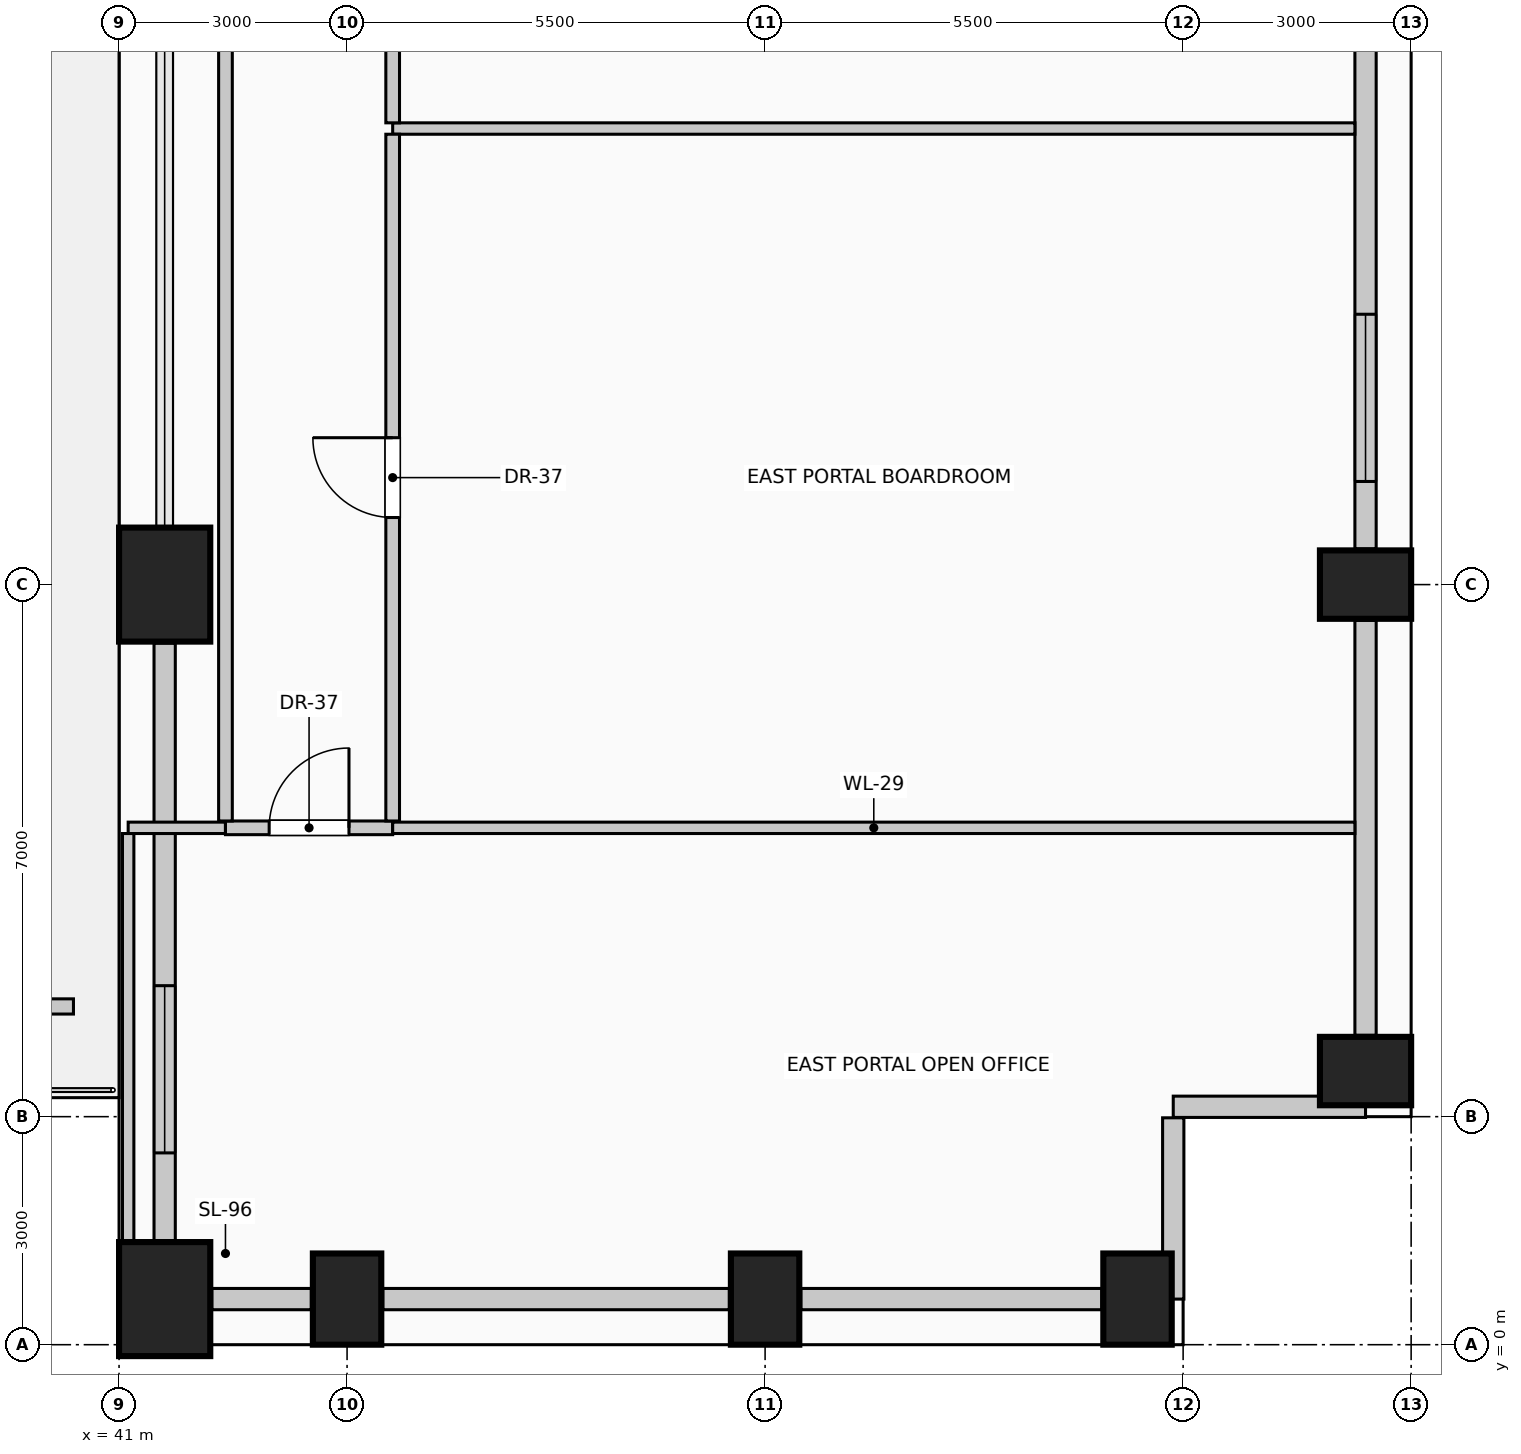
"""IFC4 building model, lengths in metres.
Left out: names, types, materials, properties, quantities, classifications, styles, units other than length and angle.
Written with IfcOpenShell. Run it as: python <this file> out.ifc"""

import sys

from ifc_helpers import new_model, si_unit, direction, frame, frame_2d, origin, origin_2d, place, context, subcontext, project, spatial, rectangle, extrude, element, fill, save


model = new_model("IFC4")
c1 = context("Model", 3, precision=1e-05, world=origin(), true_north=direction((0.0, 1.0)))
c2 = subcontext(c1, "Body", "Model", "MODEL_VIEW")
j1 = project(units=[si_unit("LENGTHUNIT", "METRE"), si_unit("PLANEANGLEUNIT", "RADIAN")], contexts=[c1])
p1 = place(None, origin())
s1 = spatial("IfcSite", under=j1, at=p1, CompositionType="ELEMENT")
p2 = place(p1, origin())
s2 = spatial("IfcBuilding", under=s1, at=p2, CompositionType="ELEMENT")
p3 = place(p2, frame((0.0, 0.0, 22.6)))
s3 = spatial("IfcBuildingStorey", under=s2, at=p3, CompositionType="ELEMENT", Elevation=22.6)
p4 = place(p3, frame((41.6, 0.6, 0.0), z_axis=(0.0, 0.0, 1.0), x_axis=(1.0, 0.0, 0.0)))
e1 = element("IfcColumn", 1, at=p4, inside=s3, PredefinedType="COLUMN", context=c2, shape_type="SweptSolid", body=[
    extrude(rectangle(XDim=1.2, YDim=1.5, at=origin_2d()), origin(), (0.0, 0.0, 1.0), 4.0),
])
for number, where, z_axis, x_axis in (
    (2, (44.0, 0.6, 0.0), (0.0, 0.0, 1.0), (1.0, 0.0, 0.0)),
    (3, (49.5, 0.6, 0.0), (0.0, 0.0, 1.0), (1.0, 0.0, 0.0)),
    (4, (54.4, 0.6, 0.0), (0.0, 0.0, 1.0), (1.0, 0.0, 0.0)),
    (5, (57.4, 3.6, 0.0), (0.0, 0.0, 1.0), (0.0, 1.0, 0.0)),
    (6, (57.4, 10.0, 0.0), (0.0, 0.0, 1.0), (0.0, 1.0, 0.0)),
):
    element("IfcColumn", number, at=place(p3, frame(where, z_axis=z_axis, x_axis=x_axis)), inside=s3, PredefinedType="COLUMN", context=c2, shape_type="SweptSolid", body=[
        extrude(rectangle(XDim=0.9, YDim=1.2, at=origin_2d()), origin(), (0.0, 0.0, 1.0), 4.0),
    ])
p5 = place(p3, frame((41.6, 10.0, 0.0), z_axis=(0.0, 0.0, 1.0), x_axis=(1.0, 0.0, 0.0)))
e7 = element("IfcColumn", 7, at=p5, inside=s3, PredefinedType="COLUMN", context=c2, shape_type="SweptSolid", body=[
    extrude(rectangle(XDim=1.2, YDim=1.5, at=origin_2d()), origin(), (0.0, 0.0, 1.0), 4.0),
])
p6 = place(p3, frame((43.53, 0.6, 0.0), z_axis=(0.0, 0.0, 1.0), x_axis=(-1.0, 0.0, 0.0)))
e8 = element("IfcWall", 8, at=p6, inside=s3, PredefinedType="SOLIDWALL", context=c2, shape_type="SweptSolid", body=[
    extrude(rectangle(XDim=1.31, YDim=0.28, at=frame_2d((0.655, 0.0))), origin(), (0.0, 0.0, 1.0), 2.85),
])
p7 = place(p3, frame((49.03, 0.6, 0.0), z_axis=(0.0, 0.0, 1.0), x_axis=(-1.0, 0.0, 0.0)))
e9 = element("IfcWall", 9, at=p7, inside=s3, PredefinedType="SOLIDWALL", context=c2, shape_type="SweptSolid", body=[
    extrude(rectangle(XDim=4.56, YDim=0.28, at=frame_2d((2.28, 0.0))), origin(), (0.0, 0.0, 1.0), 2.85),
])
p8 = place(p3, frame((53.93, 0.6, 0.0), z_axis=(0.0, 0.0, 1.0), x_axis=(-1.0, 0.0, 0.0)))
e10 = element("IfcWall", 10, at=p8, inside=s3, PredefinedType="SOLIDWALL", context=c2, shape_type="SweptSolid", body=[
    extrude(rectangle(XDim=3.96, YDim=0.28, at=frame_2d((1.98, 0.0))), origin(), (0.0, 0.0, 1.0), 2.85),
])
p9 = place(p3, frame((57.4, 9.53, 0.0), z_axis=(0.0, 0.0, 1.0), x_axis=(0.0, -1.0, 0.0)))
e11 = element("IfcWall", 11, at=p9, inside=s3, PredefinedType="SOLIDWALL", context=c2, shape_type="SweptSolid", body=[
    extrude(rectangle(XDim=5.46, YDim=0.28, at=frame_2d((2.73, 0.0))), origin(), (0.0, 0.0, 1.0), 2.85),
])
p10 = place(p3, frame((57.4, 17.53, 0.0), z_axis=(0.0, 0.0, 1.0), x_axis=(0.0, -1.0, 0.0)))
e12 = element("IfcWall", 12, at=p10, inside=s3, PredefinedType="SOLIDWALL", context=c2, shape_type="SweptSolid", body=[
    extrude(rectangle(XDim=7.06, YDim=0.28, at=frame_2d((3.53, 0.0))), origin(), (0.0, 0.0, 1.0), 2.85),
])
p11 = place(p10, frame((3.973, 0.0, 0.42)))
e13 = element("IfcOpeningElement", 13, at=p11, cuts=e12, PredefinedType="OPENING", context=c2, shape_type="SweptSolid", body=[
    extrude(rectangle(XDim=2.2, YDim=1.95, at=frame_2d((1.1, 0.975))), frame((0.0, 0.15, 0.0), z_axis=(0.0, -1.0, 0.0), x_axis=(1.0, 0.0, 0.0)), (0.0, 0.0, 1.0), 0.3),
])
p12 = place(p3, frame((57.4, 3.13, 0.0), z_axis=(0.0, 0.0, 1.0), x_axis=(-1.0, 0.0, 0.0)))
e14 = element("IfcWall", 14, at=p12, inside=s3, PredefinedType="SOLIDWALL", context=c2, shape_type="SweptSolid", body=[
    extrude(rectangle(XDim=2.53, YDim=0.28, at=frame_2d((1.265, 0.0))), origin(), (0.0, 0.0, 1.0), 3.7),
])
p13 = place(p3, frame((54.87, 2.985, 0.0), z_axis=(0.0, 0.0, 1.0), x_axis=(0.0, -1.0, 0.0)))
e15 = element("IfcWall", 15, at=p13, inside=s3, PredefinedType="SOLIDWALL", context=c2, shape_type="SweptSolid", body=[
    extrude(rectangle(XDim=2.385, YDim=0.28, at=frame_2d((1.192, 0.0))), origin(), (0.0, 0.0, 1.0), 3.7),
])
p14 = place(p3, frame((41.6, 1.37, 0.0), z_axis=(0.0, 0.0, 1.0), x_axis=(0.0, 1.0, 0.0)))
e16 = element("IfcWall", 16, at=p14, inside=s3, PredefinedType="SOLIDWALL", context=c2, shape_type="SweptSolid", body=[
    extrude(rectangle(XDim=7.86, YDim=0.28, at=frame_2d((3.93, 0.0))), origin(), (0.0, 0.0, 1.0), 3.0),
])
p15 = place(p14, frame((1.153, 0.0, 0.42)))
e17 = element("IfcOpeningElement", 17, at=p15, cuts=e16, PredefinedType="OPENING", context=c2, shape_type="SweptSolid", body=[
    extrude(rectangle(XDim=2.2, YDim=1.95, at=frame_2d((1.1, 0.975))), frame((0.0, 0.15, 0.0), z_axis=(0.0, -1.0, 0.0), x_axis=(1.0, 0.0, 0.0)), (0.0, 0.0, 1.0), 0.3),
])
p16 = place(p3, frame((17.6, 4.45, 0.0), z_axis=(0.0, 0.0, 1.0), x_axis=(1.0, 0.0, 0.0)))
e18 = element("IfcWall", 18, at=p16, inside=s3, PredefinedType="USERDEFINED", context=c2, shape_type="SweptSolid", body=[
    extrude(rectangle(XDim=22.8, YDim=0.2, at=frame_2d((11.4, 0.0))), origin(), (0.0, 0.0, 1.0), 0.55),
])
p17 = place(p3, frame((41.12, 6.8, 0.0), z_axis=(0.0, 0.0, 1.0), x_axis=(1.0, 0.0, 0.0)))
e19 = element("IfcWall", 19, at=p17, inside=s3, PredefinedType="PARTITIONING", context=c2, shape_type="SweptSolid", body=[
    extrude(rectangle(XDim=1.28, YDim=0.15, at=frame_2d((0.64, 0.0))), origin(), (0.0, 0.0, 1.0), 3.095),
])
p18 = place(p3, frame((42.4, 6.8, 0.0), z_axis=(0.0, 0.0, 1.0), x_axis=(1.0, 0.0, 0.0)))
e20 = element("IfcWall", 20, at=p18, inside=s3, PredefinedType="PARTITIONING", context=c2, shape_type="SweptSolid", body=[
    extrude(rectangle(XDim=2.2, YDim=0.18, at=frame_2d((1.1, 0.0))), origin(), (0.0, 0.0, 1.0), 3.095),
])
p19 = place(p18, frame((0.575, 0.0, 0.0)))
e21 = element("IfcOpeningElement", 21, at=p19, cuts=e20, PredefinedType="OPENING", context=c2, shape_type="SweptSolid", body=[
    extrude(rectangle(XDim=1.05, YDim=2.15, at=frame_2d((0.525, 1.075))), frame((0.0, 0.1, 0.0), z_axis=(0.0, -1.0, 0.0), x_axis=(1.0, 0.0, 0.0)), (0.0, 0.0, 1.0), 0.2),
])
p20 = place(p3, frame((44.6, 6.8, 0.0), z_axis=(0.0, 0.0, 1.0), x_axis=(1.0, 0.0, 0.0)))
e22 = element("IfcWall", 22, at=p20, inside=s3, PredefinedType="PARTITIONING", context=c2, shape_type="SweptSolid", body=[
    extrude(rectangle(XDim=12.66, YDim=0.15, at=frame_2d((6.33, 0.0))), origin(), (0.0, 0.0, 1.0), 3.095),
])
p21 = place(p3, frame((44.6, 16.0, 0.0), z_axis=(0.0, 0.0, 1.0), x_axis=(1.0, 0.0, 0.0)))
e23 = element("IfcWall", 23, at=p21, inside=s3, PredefinedType="PARTITIONING", context=c2, shape_type="SweptSolid", body=[
    extrude(rectangle(XDim=12.66, YDim=0.15, at=frame_2d((6.33, 0.0))), origin(), (0.0, 0.0, 1.0), 3.7),
])
p22 = place(p3, frame((41.12, 1.35, 0.0), z_axis=(0.0, 0.0, 1.0), x_axis=(0.0, 1.0, 0.0)))
e24 = element("IfcWall", 24, at=p22, inside=s3, PredefinedType="PARTITIONING", context=c2, shape_type="SweptSolid", body=[
    extrude(rectangle(XDim=5.375, YDim=0.15, at=frame_2d((2.688, 0.0))), origin(), (0.0, 0.0, 1.0), 3.7),
])
p23 = place(p3, frame((42.4, 6.89, 0.0), z_axis=(0.0, 0.0, 1.0), x_axis=(0.0, 1.0, 0.0)))
e25 = element("IfcWall", 25, at=p23, inside=s3, PredefinedType="PARTITIONING", context=c2, shape_type="SweptSolid", body=[
    extrude(rectangle(XDim=25.385, YDim=0.18, at=frame_2d((12.692, 0.0))), origin(), (0.0, 0.0, 1.0), 3.7),
])
p24 = place(p3, frame((44.6, 6.89, 0.0), z_axis=(0.0, 0.0, 1.0), x_axis=(0.0, 1.0, 0.0)))
e26 = element("IfcWall", 26, at=p24, inside=s3, PredefinedType="PARTITIONING", context=c2, shape_type="SweptSolid", body=[
    extrude(rectangle(XDim=9.035, YDim=0.18, at=frame_2d((4.518, 0.0))), origin(), (0.0, 0.0, 1.0), 3.7),
])
p25 = place(p24, frame((3.992, 0.0, 0.0)))
e27 = element("IfcOpeningElement", 27, at=p25, cuts=e26, PredefinedType="OPENING", context=c2, shape_type="SweptSolid", body=[
    extrude(rectangle(XDim=1.05, YDim=2.15, at=frame_2d((0.525, 1.075))), frame((0.0, 0.1, 0.0), z_axis=(0.0, -1.0, 0.0), x_axis=(1.0, 0.0, 0.0)), (0.0, 0.0, 1.0), 0.2),
])
p26 = place(p3, frame((44.6, 16.075, 0.0), z_axis=(0.0, 0.0, 1.0), x_axis=(0.0, 1.0, 0.0)))
e28 = element("IfcWall", 28, at=p26, inside=s3, PredefinedType="PARTITIONING", context=c2, shape_type="SweptSolid", body=[
    extrude(rectangle(XDim=5.25, YDim=0.18, at=frame_2d((2.625, 0.0))), origin(), (0.0, 0.0, 1.0), 3.7),
])
p27 = place(p26, frame((2.15, 0.0, 0.0)))
e29 = element("IfcOpeningElement", 29, at=p27, cuts=e28, PredefinedType="OPENING", context=c2, shape_type="SweptSolid", body=[
    extrude(rectangle(XDim=0.95, YDim=2.15, at=frame_2d((0.475, 1.075))), frame((0.0, 0.1, 0.0), z_axis=(0.0, -1.0, 0.0), x_axis=(1.0, 0.0, 0.0)), (0.0, 0.0, 1.0), 0.2),
])
p28 = place(p11, origin())
e30 = element("IfcWindow", 30, at=p28, inside=s3, PartitioningType="SINGLE_PANEL", PredefinedType="WINDOW", context=c2, shape_type="SweptSolid", body=[
    extrude(rectangle(XDim=2.2, YDim=1.95, at=frame_2d((1.1, 0.975))), frame((0.0, 0.03, 0.0), z_axis=(0.0, -1.0, 0.0), x_axis=(1.0, 0.0, 0.0)), (0.0, 0.0, 1.0), 0.06),
])
fill(e13, e30)
p29 = place(p15, origin())
e31 = element("IfcWindow", 31, at=p29, inside=s3, PartitioningType="SINGLE_PANEL", PredefinedType="WINDOW", context=c2, shape_type="SweptSolid", body=[
    extrude(rectangle(XDim=2.2, YDim=1.95, at=frame_2d((1.1, 0.975))), frame((0.0, 0.03, 0.0), z_axis=(0.0, -1.0, 0.0), x_axis=(1.0, 0.0, 0.0)), (0.0, 0.0, 1.0), 0.06),
])
fill(e17, e31)
p30 = place(p19, origin())
e32 = element("IfcDoor", 32, at=p30, inside=s3, OperationType="SINGLE_SWING_RIGHT", PredefinedType="DOOR", context=c2, shape_type="SweptSolid", body=[
    extrude(rectangle(XDim=1.05, YDim=2.15, at=frame_2d((0.525, 1.075))), frame((0.0, 0.025, 0.0), z_axis=(0.0, -1.0, 0.0), x_axis=(1.0, 0.0, 0.0)), (0.0, 0.0, 1.0), 0.05),
])
fill(e21, e32)
p31 = place(p25, origin())
e33 = element("IfcDoor", 33, at=p31, inside=s3, OperationType="SINGLE_SWING_RIGHT", PredefinedType="DOOR", context=c2, shape_type="SweptSolid", body=[
    extrude(rectangle(XDim=1.05, YDim=2.15, at=frame_2d((0.525, 1.075))), frame((0.0, 0.025, 0.0), z_axis=(0.0, -1.0, 0.0), x_axis=(1.0, 0.0, 0.0)), (0.0, 0.0, 1.0), 0.05),
])
fill(e27, e33)
save(model, sys.argv[1])
